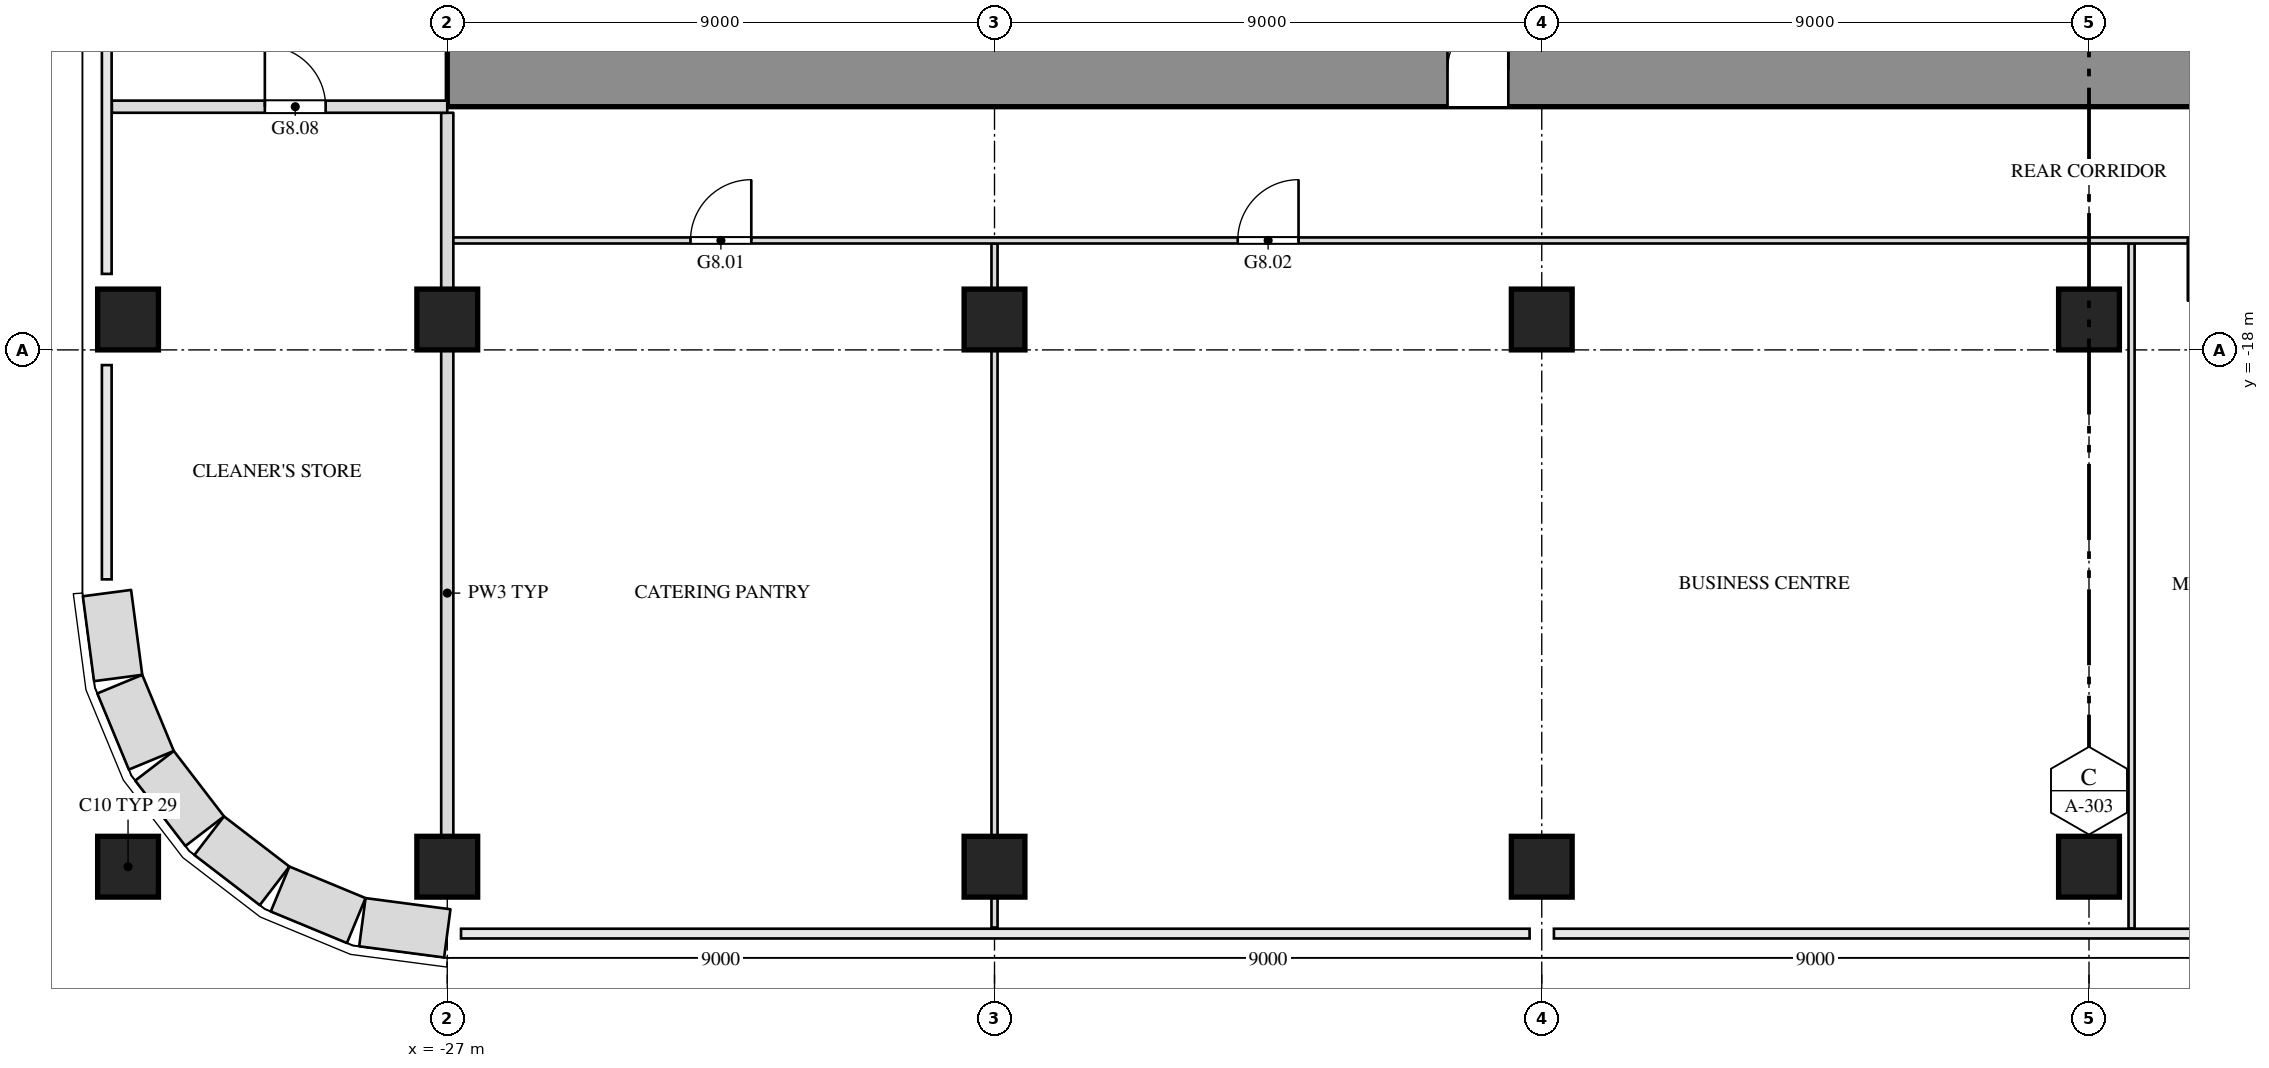
"""IFC4 building model, lengths in metres.
Left out: names, types, materials, properties, quantities, classifications, styles, units other than length and angle.
Written with IfcOpenShell. Run it as: python <this file> out.ifc"""

import sys

from ifc_helpers import new_model, si_unit, direction, frame, frame_2d, origin, origin_2d, place, context, subcontext, project, spatial, rectangle, extrude, element, fill, save


model = new_model("IFC4")
c1 = context("Model", 3, precision=1e-05, world=origin(), true_north=direction((0.0, 1.0)))
c2 = subcontext(c1, "Body", "Model", "MODEL_VIEW")
j1 = project(units=[si_unit("LENGTHUNIT", "METRE"), si_unit("PLANEANGLEUNIT", "RADIAN")], contexts=[c1])
p1 = place(None, origin())
s1 = spatial("IfcSite", under=j1, at=p1, CompositionType="ELEMENT")
p2 = place(p1, origin())
s2 = spatial("IfcBuilding", under=s1, at=p2, CompositionType="ELEMENT")
p3 = place(p2, frame((0.0, 0.0, 48.0)))
s3 = spatial("IfcBuildingStorey", under=s2, at=p3, CompositionType="ELEMENT", Elevation=48.0)
for number, where, z_axis, x_axis in (
    (1, (-32.25, -26.5, 0.0), (0.0, 0.0, 1.0), (1.0, 0.0, 0.0)),
    (2, (-27.0, -26.5, 0.0), (0.0, 0.0, 1.0), (1.0, 0.0, 0.0)),
    (3, (-18.0, -26.5, 0.0), (0.0, 0.0, 1.0), (1.0, 0.0, 0.0)),
    (4, (-9.0, -26.5, 0.0), (0.0, 0.0, 1.0), (1.0, 0.0, 0.0)),
    (5, (0.0, -26.5, 0.0), (0.0, 0.0, 1.0), (1.0, 0.0, 0.0)),
    (6, (-32.25, -17.5, 0.0), (0.0, 0.0, 1.0), (1.0, 0.0, 0.0)),
    (7, (-27.0, -17.5, 0.0), (0.0, 0.0, 1.0), (1.0, 0.0, 0.0)),
    (8, (-18.0, -17.5, 0.0), (0.0, 0.0, 1.0), (1.0, 0.0, 0.0)),
    (9, (-9.0, -17.5, 0.0), (0.0, 0.0, 1.0), (1.0, 0.0, 0.0)),
    (10, (0.0, -17.5, 0.0), (0.0, 0.0, 1.0), (1.0, 0.0, 0.0)),
):
    element("IfcColumn", number, at=place(p3, frame(where, z_axis=z_axis, x_axis=x_axis)), inside=s3, PredefinedType="COLUMN", context=c2, shape_type="SweptSolid", body=[
        extrude(rectangle(XDim=1.0, YDim=1.0, at=origin_2d()), origin(), (0.0, 0.0, 1.0), 4.5),
    ])
p4 = place(p3, frame((-27.0, -13.4, 0.0), z_axis=(0.0, 0.0, 1.0), x_axis=(1.0, 0.0, 0.0)))
e11 = element("IfcWall", 11, at=p4, inside=s3, PredefinedType="SHEAR", context=c2, shape_type="SweptSolid", body=[
    extrude(rectangle(XDim=54.0, YDim=1.2, at=frame_2d((27.0, 0.0))), origin(), (0.0, 0.0, 1.0), 4.3),
])
p5 = place(p4, frame((16.45, 0.0, 0.0)))
e12 = element("IfcOpeningElement", 12, at=p5, cuts=e11, PredefinedType="OPENING", context=c2, shape_type="SweptSolid", body=[
    extrude(rectangle(XDim=1.0, YDim=2.1, at=frame_2d((0.5, 1.05))), frame((0.0, 0.612, 0.0), z_axis=(0.0, -1.0, 0.0), x_axis=(1.0, 0.0, 0.0)), (0.0, 0.0, 1.0), 1.224),
])
p6 = place(p4, frame((36.55, 0.0, 0.0)))
e13 = element("IfcOpeningElement", 13, at=p6, cuts=e11, PredefinedType="OPENING", context=c2, shape_type="SweptSolid", body=[
    extrude(rectangle(XDim=1.0, YDim=2.1, at=frame_2d((0.5, 1.05))), frame((0.0, 0.612, 0.0), z_axis=(0.0, -1.0, 0.0), x_axis=(1.0, 0.0, 0.0)), (0.0, 0.0, 1.0), 1.224),
])
p7 = place(p3, frame((-18.0, -27.5, 0.0), z_axis=(0.0, 0.0, 1.0), x_axis=(0.0, 1.0, 0.0)))
e14 = element("IfcWall", 14, at=p7, inside=s3, PredefinedType="PARTITIONING", context=c2, shape_type="SweptSolid", body=[
    extrude(rectangle(XDim=0.5, YDim=0.1, at=frame_2d((0.25, 0.0))), origin(), (0.0, 0.0, 1.0), 4.3),
])
p8 = place(p3, frame((-18.0, -26.0, 0.0), z_axis=(0.0, 0.0, 1.0), x_axis=(0.0, 1.0, 0.0)))
e15 = element("IfcWall", 15, at=p8, inside=s3, PredefinedType="PARTITIONING", context=c2, shape_type="SweptSolid", body=[
    extrude(rectangle(XDim=8.0, YDim=0.1, at=frame_2d((4.0, 0.0))), origin(), (0.0, 0.0, 1.0), 3.688),
])
p9 = place(p3, frame((-18.0, -17.0, 0.0), z_axis=(0.0, 0.0, 1.0), x_axis=(0.0, 1.0, 0.0)))
e16 = element("IfcWall", 16, at=p9, inside=s3, PredefinedType="PARTITIONING", context=c2, shape_type="SweptSolid", body=[
    extrude(rectangle(XDim=0.75, YDim=0.1, at=frame_2d((0.375, 0.0))), origin(), (0.0, 0.0, 1.0), 4.3),
])
p10 = place(p3, frame((0.7, -27.516, 0.0), z_axis=(0.0, 0.0, 1.0), x_axis=(0.0, 1.0, 0.0)))
e17 = element("IfcWall", 17, at=p10, inside=s3, PredefinedType="PARTITIONING", context=c2, shape_type="SweptSolid", body=[
    extrude(rectangle(XDim=11.266, YDim=0.1, at=frame_2d((5.633, 0.0))), origin(), (0.0, 0.0, 1.0), 4.3),
])
p11 = place(p3, frame((-27.0, -26.0, 0.0), z_axis=(0.0, 0.0, 1.0), x_axis=(0.0, 1.0, 0.0)))
e18 = element("IfcWall", 18, at=p11, inside=s3, PredefinedType="PARTITIONING", context=c2, shape_type="SweptSolid", body=[
    extrude(rectangle(XDim=8.0, YDim=0.2, at=frame_2d((4.0, 0.0))), origin(), (0.0, 0.0, 1.0), 3.688),
])
p12 = place(p3, frame((-27.0, -17.0, 0.0), z_axis=(0.0, 0.0, 1.0), x_axis=(0.0, 1.0, 0.0)))
e19 = element("IfcWall", 19, at=p12, inside=s3, PredefinedType="PARTITIONING", context=c2, shape_type="SweptSolid", body=[
    extrude(rectangle(XDim=2.9, YDim=0.2, at=frame_2d((1.45, 0.0))), origin(), (0.0, 0.0, 1.0), 3.688),
])
p13 = place(p3, frame((-26.9, -16.2, 0.0), z_axis=(0.0, 0.0, 1.0), x_axis=(1.0, 0.0, 0.0)))
e20 = element("IfcWall", 20, at=p13, inside=s3, PredefinedType="PARTITIONING", context=c2, shape_type="SweptSolid", body=[
    extrude(rectangle(XDim=53.825, YDim=0.1, at=frame_2d((26.913, 0.0))), origin(), (0.0, 0.0, 1.0), 4.3),
])
p14 = place(p13, frame((3.9, 0.0, 0.0)))
e21 = element("IfcOpeningElement", 21, at=p14, cuts=e20, PredefinedType="OPENING", context=c2, shape_type="SweptSolid", body=[
    extrude(rectangle(XDim=1.0, YDim=2.1, at=frame_2d((0.5, 1.05))), frame((0.0, 0.062, 0.0), z_axis=(0.0, -1.0, 0.0), x_axis=(1.0, 0.0, 0.0)), (0.0, 0.0, 1.0), 0.124),
])
p15 = place(p13, frame((12.9, 0.0, 0.0)))
e22 = element("IfcOpeningElement", 22, at=p15, cuts=e20, PredefinedType="OPENING", context=c2, shape_type="SweptSolid", body=[
    extrude(rectangle(XDim=1.0, YDim=2.1, at=frame_2d((0.5, 1.05))), frame((0.0, 0.062, 0.0), z_axis=(0.0, -1.0, 0.0), x_axis=(1.0, 0.0, 0.0)), (0.0, 0.0, 1.0), 0.124),
])
p16 = place(p13, frame((28.525, 0.0, 0.0)))
e23 = element("IfcOpeningElement", 23, at=p16, cuts=e20, PredefinedType="OPENING", context=c2, shape_type="SweptSolid", body=[
    extrude(rectangle(XDim=1.0, YDim=2.1, at=frame_2d((0.5, 1.05))), frame((0.0, 0.062, 0.0), z_axis=(0.0, -1.0, 0.0), x_axis=(1.0, 0.0, 0.0)), (0.0, 0.0, 1.0), 0.124),
])
p17 = place(p13, frame((31.375, 0.0, 0.0)))
e24 = element("IfcOpeningElement", 24, at=p17, cuts=e20, PredefinedType="OPENING", context=c2, shape_type="SweptSolid", body=[
    extrude(rectangle(XDim=1.0, YDim=2.1, at=frame_2d((0.5, 1.05))), frame((0.0, 0.062, 0.0), z_axis=(0.0, -1.0, 0.0), x_axis=(1.0, 0.0, 0.0)), (0.0, 0.0, 1.0), 0.124),
])
p18 = place(p13, frame((33.75, 0.0, 0.0)))
e25 = element("IfcOpeningElement", 25, at=p18, cuts=e20, PredefinedType="OPENING", context=c2, shape_type="SweptSolid", body=[
    extrude(rectangle(XDim=1.0, YDim=2.1, at=frame_2d((0.5, 1.05))), frame((0.0, 0.062, 0.0), z_axis=(0.0, -1.0, 0.0), x_axis=(1.0, 0.0, 0.0)), (0.0, 0.0, 1.0), 0.124),
])
p19 = place(p13, frame((39.9, 0.0, 0.0)))
e26 = element("IfcOpeningElement", 26, at=p19, cuts=e20, PredefinedType="OPENING", context=c2, shape_type="SweptSolid", body=[
    extrude(rectangle(XDim=1.0, YDim=2.1, at=frame_2d((0.5, 1.05))), frame((0.0, 0.062, 0.0), z_axis=(0.0, -1.0, 0.0), x_axis=(1.0, 0.0, 0.0)), (0.0, 0.0, 1.0), 0.124),
])
p20 = place(p13, frame((48.9, 0.0, 0.0)))
e27 = element("IfcOpeningElement", 27, at=p20, cuts=e20, PredefinedType="OPENING", context=c2, shape_type="SweptSolid", body=[
    extrude(rectangle(XDim=1.0, YDim=2.1, at=frame_2d((0.5, 1.05))), frame((0.0, 0.062, 0.0), z_axis=(0.0, -1.0, 0.0), x_axis=(1.0, 0.0, 0.0)), (0.0, 0.0, 1.0), 0.124),
])
p21 = place(p3, frame((-32.516, -14.0, 0.0), z_axis=(0.0, 0.0, 1.0), x_axis=(1.0, 0.0, 0.0)))
e28 = element("IfcWall", 28, at=p21, inside=s3, PredefinedType="PARTITIONING", context=c2, shape_type="SweptSolid", body=[
    extrude(rectangle(XDim=5.516, YDim=0.2, at=frame_2d((2.758, 0.0))), origin(), (0.0, 0.0, 1.0), 4.3),
])
p22 = place(p21, frame((2.516, 0.0, 0.0)))
e29 = element("IfcOpeningElement", 29, at=p22, cuts=e28, PredefinedType="OPENING", context=c2, shape_type="SweptSolid", body=[
    extrude(rectangle(XDim=1.0, YDim=2.1, at=frame_2d((0.5, 1.05))), frame((0.0, 0.112, 0.0), z_axis=(0.0, -1.0, 0.0), x_axis=(1.0, 0.0, 0.0)), (0.0, 0.0, 1.0), 0.224),
])
p23 = place(p3, frame((-32.597, -22.0, 0.0), z_axis=(0.0, 0.0, 1.0), x_axis=(0.130517283865, -0.99144603414, 0.0)))
e30 = element("IfcWall", 30, at=p23, inside=s3, PredefinedType="SOLIDWALL", context=c2, shape_type="SweptSolid", body=[
    extrude(rectangle(XDim=1.408, YDim=0.8, at=frame_2d((0.704, 0.0))), origin(), (0.0, 0.0, 1.0), 4.3),
])
p24 = place(p3, frame((-32.386, -23.497, 0.0), z_axis=(0.0, 0.0, 1.0), x_axis=(0.38276009378, -0.923847774587, 0.0)))
e31 = element("IfcWall", 31, at=p24, inside=s3, PredefinedType="SOLIDWALL", context=c2, shape_type="SweptSolid", body=[
    extrude(rectangle(XDim=1.355, YDim=0.8, at=frame_2d((0.678, 0.0))), origin(), (0.0, 0.0, 1.0), 4.3),
])
for number, where, z_axis, x_axis in (
    (32, (-31.815, -24.84, 0.0), (0.0, 0.0, 1.0), (0.609, -0.793, 0.0)),
    (33, (-30.916, -25.989, 0.0), (0.0, 0.0, 1.0), (0.793, -0.609, 0.0)),
):
    element("IfcWall", number, at=place(p3, frame(where, z_axis=z_axis, x_axis=x_axis)), inside=s3, PredefinedType="SOLIDWALL", context=c2, shape_type="SweptSolid", body=[
        extrude(rectangle(XDim=1.356, YDim=0.8, at=frame_2d((0.678, 0.0))), origin(), (0.0, 0.0, 1.0), 4.3),
    ])
p25 = place(p3, frame((-29.75, -26.867, 0.0), z_axis=(0.0, 0.0, 1.0), x_axis=(0.923847774587, -0.38276009378, 0.0)))
e34 = element("IfcWall", 34, at=p25, inside=s3, PredefinedType="SOLIDWALL", context=c2, shape_type="SweptSolid", body=[
    extrude(rectangle(XDim=1.355, YDim=0.8, at=frame_2d((0.678, 0.0))), origin(), (0.0, 0.0, 1.0), 4.3),
])
p26 = place(p3, frame((-28.396, -27.413, 0.0), z_axis=(0.0, 0.0, 1.0), x_axis=(0.99144603414, -0.130517283865, 0.0)))
e35 = element("IfcWall", 35, at=p26, inside=s3, PredefinedType="SOLIDWALL", context=c2, shape_type="SweptSolid", body=[
    extrude(rectangle(XDim=1.408, YDim=0.8, at=frame_2d((0.704, 0.0))), origin(), (0.0, 0.0, 1.0), 4.3),
])
p27 = place(p14, origin())
e36 = element("IfcDoor", 36, at=p27, inside=s3, OperationType="SINGLE_SWING_RIGHT", PredefinedType="DOOR", context=c2, shape_type="SweptSolid", body=[
    extrude(rectangle(XDim=1.0, YDim=2.1, at=frame_2d((0.5, 1.05))), frame((0.0, 0.025, 0.0), z_axis=(0.0, -1.0, 0.0), x_axis=(1.0, 0.0, 0.0)), (0.0, 0.0, 1.0), 0.05),
])
fill(e21, e36)
p28 = place(p15, origin())
e37 = element("IfcDoor", 37, at=p28, inside=s3, OperationType="SINGLE_SWING_RIGHT", PredefinedType="DOOR", context=c2, shape_type="SweptSolid", body=[
    extrude(rectangle(XDim=1.0, YDim=2.1, at=frame_2d((0.5, 1.05))), frame((0.0, 0.025, 0.0), z_axis=(0.0, -1.0, 0.0), x_axis=(1.0, 0.0, 0.0)), (0.0, 0.0, 1.0), 0.05),
])
fill(e22, e37)
p29 = place(p16, origin())
e38 = element("IfcDoor", 38, at=p29, inside=s3, OperationType="SINGLE_SWING_RIGHT", PredefinedType="DOOR", context=c2, shape_type="SweptSolid", body=[
    extrude(rectangle(XDim=1.0, YDim=2.1, at=frame_2d((0.5, 1.05))), frame((0.0, 0.025, 0.0), z_axis=(0.0, -1.0, 0.0), x_axis=(1.0, 0.0, 0.0)), (0.0, 0.0, 1.0), 0.05),
])
fill(e23, e38)
p30 = place(p22, origin())
e39 = element("IfcDoor", 39, at=p30, inside=s3, OperationType="SINGLE_SWING_LEFT", PredefinedType="DOOR", context=c2, shape_type="SweptSolid", body=[
    extrude(rectangle(XDim=1.0, YDim=2.1, at=frame_2d((0.5, 1.05))), frame((0.0, 0.025, 0.0), z_axis=(0.0, -1.0, 0.0), x_axis=(1.0, 0.0, 0.0)), (0.0, 0.0, 1.0), 0.05),
])
fill(e29, e39)
p31 = place(p5, origin())
e40 = element("IfcDoor", 40, at=p31, inside=s3, OperationType="SINGLE_SWING_RIGHT", PredefinedType="DOOR", context=c2, shape_type="SweptSolid", body=[
    extrude(rectangle(XDim=1.0, YDim=2.1, at=frame_2d((0.5, 1.05))), frame((0.0, 0.025, 0.0), z_axis=(0.0, -1.0, 0.0), x_axis=(1.0, 0.0, 0.0)), (0.0, 0.0, 1.0), 0.05),
])
fill(e12, e40)
save(model, sys.argv[1])
